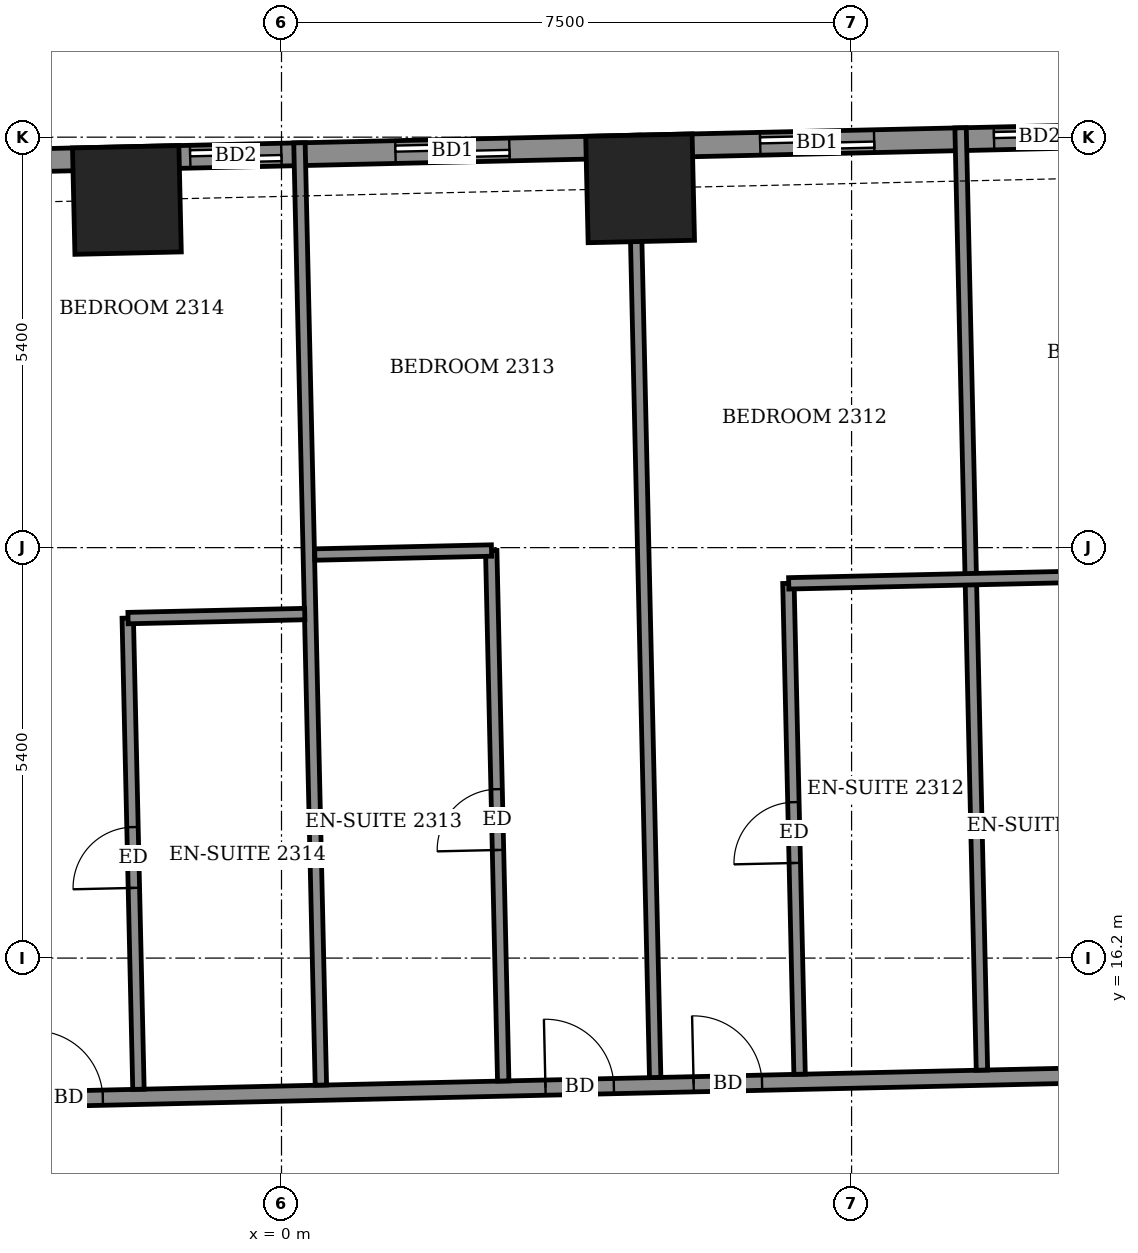
"""IFC4 building model, lengths in metres.
Left out: names, types, materials, properties, quantities, classifications, styles, units other than length and angle.
Written with IfcOpenShell. Run it as: python <this file> out.ifc"""

import sys

from ifc_helpers import new_model, si_unit, direction, frame, frame_2d, origin, origin_2d, place, context, subcontext, project, spatial, rectangle, extrude, element, fill, save


model = new_model("IFC4")
c1 = context("Model", 3, precision=1e-05, world=origin(), true_north=direction((0.0, 1.0)))
c2 = subcontext(c1, "Body", "Model", "MODEL_VIEW")
j1 = project(units=[si_unit("LENGTHUNIT", "METRE"), si_unit("PLANEANGLEUNIT", "RADIAN")], contexts=[c1])
p1 = place(None, origin())
s1 = spatial("IfcSite", under=j1, at=p1, CompositionType="ELEMENT")
p2 = place(p1, origin())
s2 = spatial("IfcBuilding", under=s1, at=p2, CompositionType="ELEMENT")
p3 = place(p2, frame((0.0, 0.0, 93.7)))
s3 = spatial("IfcBuildingStorey", under=s2, at=p3, CompositionType="ELEMENT", Elevation=93.7)
for number, where, z_axis, x_axis in (
    (1, (4.718, 26.327, -0.55), (0.0, 0.0, 1.0), (-1.0, -0.023, 0.0)),
    (2, (-2.034, 26.174, -0.55), (0.0, 0.0, 1.0), (-1.0, -0.023, 0.0)),
):
    element("IfcColumn", number, at=place(p3, frame(where, z_axis=z_axis, x_axis=x_axis)), inside=s3, PredefinedType="COLUMN", context=c2, shape_type="SweptSolid", body=[
        extrude(rectangle(XDim=1.4, YDim=1.4, at=origin_2d()), origin(), (0.0, 0.0, 1.0), 3.6),
    ])
p4 = place(p3, frame((24.809, 27.333, 0.0), z_axis=(0.0, 0.0, 1.0), x_axis=(-0.999742676884, -0.022684356233, 0.0)))
e3 = element("IfcWall", 3, at=p4, inside=s3, PredefinedType="SOLIDWALL", context=c2, shape_type="SweptSolid", body=[
    extrude(rectangle(XDim=47.301, YDim=0.3, at=frame_2d((23.651, 0.0))), origin(), (0.0, 0.0, 1.0), 3.05),
])
p5 = place(p4, frame((1.311, 0.0, 0.0)))
e4 = element("IfcOpeningElement", 4, at=p5, cuts=e3, PredefinedType="OPENING", context=c2, shape_type="SweptSolid", body=[
    extrude(rectangle(XDim=1.2, YDim=2.4, at=frame_2d((0.6, 1.2))), frame((0.0, 0.16, 0.0), z_axis=(0.0, -1.0, 0.0), x_axis=(1.0, 0.0, 0.0)), (0.0, 0.0, 1.0), 0.32),
])
p6 = place(p4, frame((3.763, 0.0, 0.0)))
e5 = element("IfcOpeningElement", 5, at=p6, cuts=e3, PredefinedType="OPENING", context=c2, shape_type="SweptSolid", body=[
    extrude(rectangle(XDim=1.5, YDim=2.4, at=frame_2d((0.75, 1.2))), frame((0.0, 0.16, 0.0), z_axis=(0.0, -1.0, 0.0), x_axis=(1.0, 0.0, 0.0)), (0.0, 0.0, 1.0), 0.32),
])
p7 = place(p4, frame((8.647, 0.0, 0.0)))
e6 = element("IfcOpeningElement", 6, at=p7, cuts=e3, PredefinedType="OPENING", context=c2, shape_type="SweptSolid", body=[
    extrude(rectangle(XDim=1.5, YDim=2.4, at=frame_2d((0.75, 1.2))), frame((0.0, 0.16, 0.0), z_axis=(0.0, -1.0, 0.0), x_axis=(1.0, 0.0, 0.0)), (0.0, 0.0, 1.0), 0.32),
])
p8 = place(p4, frame((14.239, 0.0, 0.0)))
e7 = element("IfcOpeningElement", 7, at=p8, cuts=e3, PredefinedType="OPENING", context=c2, shape_type="SweptSolid", body=[
    extrude(rectangle(XDim=1.2, YDim=2.4, at=frame_2d((0.6, 1.2))), frame((0.0, 0.16, 0.0), z_axis=(0.0, -1.0, 0.0), x_axis=(1.0, 0.0, 0.0)), (0.0, 0.0, 1.0), 0.32),
])
p9 = place(p4, frame((17.016, 0.0, 0.0)))
e8 = element("IfcOpeningElement", 8, at=p9, cuts=e3, PredefinedType="OPENING", context=c2, shape_type="SweptSolid", body=[
    extrude(rectangle(XDim=1.5, YDim=2.4, at=frame_2d((0.75, 1.2))), frame((0.0, 0.16, 0.0), z_axis=(0.0, -1.0, 0.0), x_axis=(1.0, 0.0, 0.0)), (0.0, 0.0, 1.0), 0.32),
])
p10 = place(p4, frame((21.816, 0.0, 0.0)))
e9 = element("IfcOpeningElement", 9, at=p10, cuts=e3, PredefinedType="OPENING", context=c2, shape_type="SweptSolid", body=[
    extrude(rectangle(XDim=1.5, YDim=2.4, at=frame_2d((0.75, 1.2))), frame((0.0, 0.16, 0.0), z_axis=(0.0, -1.0, 0.0), x_axis=(1.0, 0.0, 0.0)), (0.0, 0.0, 1.0), 0.32),
])
p11 = place(p4, frame((24.817, 0.0, 0.0)))
e10 = element("IfcOpeningElement", 10, at=p11, cuts=e3, PredefinedType="OPENING", context=c2, shape_type="SweptSolid", body=[
    extrude(rectangle(XDim=1.2, YDim=2.4, at=frame_2d((0.6, 1.2))), frame((0.0, 0.16, 0.0), z_axis=(0.0, -1.0, 0.0), x_axis=(1.0, 0.0, 0.0)), (0.0, 0.0, 1.0), 0.32),
])
p12 = place(p4, frame((30.244, 0.0, 0.0)))
e11 = element("IfcOpeningElement", 11, at=p12, cuts=e3, PredefinedType="OPENING", context=c2, shape_type="SweptSolid", body=[
    extrude(rectangle(XDim=1.5, YDim=2.4, at=frame_2d((0.75, 1.2))), frame((0.0, 0.16, 0.0), z_axis=(0.0, -1.0, 0.0), x_axis=(1.0, 0.0, 0.0)), (0.0, 0.0, 1.0), 0.32),
])
p13 = place(p4, frame((35.069, 0.0, 0.0)))
e12 = element("IfcOpeningElement", 12, at=p13, cuts=e3, PredefinedType="OPENING", context=c2, shape_type="SweptSolid", body=[
    extrude(rectangle(XDim=1.5, YDim=2.4, at=frame_2d((0.75, 1.2))), frame((0.0, 0.16, 0.0), z_axis=(0.0, -1.0, 0.0), x_axis=(1.0, 0.0, 0.0)), (0.0, 0.0, 1.0), 0.32),
])
p14 = place(p4, frame((37.995, 0.0, 0.0)))
e13 = element("IfcOpeningElement", 13, at=p14, cuts=e3, PredefinedType="OPENING", context=c2, shape_type="SweptSolid", body=[
    extrude(rectangle(XDim=1.5, YDim=2.4, at=frame_2d((0.75, 1.2))), frame((0.0, 0.16, 0.0), z_axis=(0.0, -1.0, 0.0), x_axis=(1.0, 0.0, 0.0)), (0.0, 0.0, 1.0), 0.32),
])
p15 = place(p4, frame((42.674, 0.0, 0.9)))
e14 = element("IfcOpeningElement", 14, at=p15, cuts=e3, PredefinedType="OPENING", context=c2, shape_type="SweptSolid", body=[
    extrude(rectangle(XDim=2.4, YDim=1.5, at=frame_2d((1.2, 0.75))), frame((0.0, 0.16, 0.0), z_axis=(0.0, -1.0, 0.0), x_axis=(1.0, 0.0, 0.0)), (0.0, 0.0, 1.0), 0.32),
])
p16 = place(p3, frame((-24.92, 13.851, 0.0), z_axis=(0.0, 0.0, 1.0), x_axis=(0.999742411711, 0.022696039895, 0.0)))
e15 = element("IfcWall", 15, at=p16, inside=s3, PredefinedType="PARTITIONING", context=c2, shape_type="SweptSolid", body=[
    extrude(rectangle(XDim=52.472, YDim=0.2, at=frame_2d((26.236, 0.0))), origin(), (0.0, 0.0, 1.0), 3.05),
])
p17 = place(p16, frame((50.088, 0.0, 0.0)))
e16 = element("IfcOpeningElement", 16, at=p17, cuts=e15, PredefinedType="OPENING", context=c2, shape_type="SweptSolid", body=[
    extrude(rectangle(XDim=1.0, YDim=2.1, at=frame_2d((0.5, 1.05))), frame((0.0, 0.11, 0.0), z_axis=(0.0, -1.0, 0.0), x_axis=(1.0, 0.0, 0.0)), (0.0, 0.0, 1.0), 0.22),
])
p18 = place(p16, frame((45.725, 0.0, 0.0)))
e17 = element("IfcOpeningElement", 17, at=p18, cuts=e15, PredefinedType="OPENING", context=c2, shape_type="SweptSolid", body=[
    extrude(rectangle(XDim=0.9, YDim=2.1, at=frame_2d((0.45, 1.05))), frame((0.0, 0.11, 0.0), z_axis=(0.0, -1.0, 0.0), x_axis=(1.0, 0.0, 0.0)), (0.0, 0.0, 1.0), 0.22),
])
p19 = place(p16, frame((38.975, 0.0, 0.0)))
e18 = element("IfcOpeningElement", 18, at=p19, cuts=e15, PredefinedType="OPENING", context=c2, shape_type="SweptSolid", body=[
    extrude(rectangle(XDim=0.9, YDim=2.1, at=frame_2d((0.45, 1.05))), frame((0.0, 0.11, 0.0), z_axis=(0.0, -1.0, 0.0), x_axis=(1.0, 0.0, 0.0)), (0.0, 0.0, 1.0), 0.22),
])
p20 = place(p16, frame((37.05, 0.0, 0.0)))
e19 = element("IfcOpeningElement", 19, at=p20, cuts=e15, PredefinedType="OPENING", context=c2, shape_type="SweptSolid", body=[
    extrude(rectangle(XDim=0.9, YDim=2.1, at=frame_2d((0.45, 1.05))), frame((0.0, 0.11, 0.0), z_axis=(0.0, -1.0, 0.0), x_axis=(1.0, 0.0, 0.0)), (0.0, 0.0, 1.0), 0.22),
])
p21 = place(p16, frame((30.35, 0.0, 0.0)))
e20 = element("IfcOpeningElement", 20, at=p21, cuts=e15, PredefinedType="OPENING", context=c2, shape_type="SweptSolid", body=[
    extrude(rectangle(XDim=0.9, YDim=2.1, at=frame_2d((0.45, 1.05))), frame((0.0, 0.11, 0.0), z_axis=(0.0, -1.0, 0.0), x_axis=(1.0, 0.0, 0.0)), (0.0, 0.0, 1.0), 0.22),
])
p22 = place(p16, frame((28.4, 0.0, 0.0)))
e21 = element("IfcOpeningElement", 21, at=p22, cuts=e15, PredefinedType="OPENING", context=c2, shape_type="SweptSolid", body=[
    extrude(rectangle(XDim=0.9, YDim=2.1, at=frame_2d((0.45, 1.05))), frame((0.0, 0.11, 0.0), z_axis=(0.0, -1.0, 0.0), x_axis=(1.0, 0.0, 0.0)), (0.0, 0.0, 1.0), 0.22),
])
p23 = place(p16, frame((21.675, 0.0, 0.0)))
e22 = element("IfcOpeningElement", 22, at=p23, cuts=e15, PredefinedType="OPENING", context=c2, shape_type="SweptSolid", body=[
    extrude(rectangle(XDim=0.9, YDim=2.1, at=frame_2d((0.45, 1.05))), frame((0.0, 0.11, 0.0), z_axis=(0.0, -1.0, 0.0), x_axis=(1.0, 0.0, 0.0)), (0.0, 0.0, 1.0), 0.22),
])
p24 = place(p16, frame((19.775, 0.0, 0.0)))
e23 = element("IfcOpeningElement", 23, at=p24, cuts=e15, PredefinedType="OPENING", context=c2, shape_type="SweptSolid", body=[
    extrude(rectangle(XDim=0.9, YDim=2.1, at=frame_2d((0.45, 1.05))), frame((0.0, 0.11, 0.0), z_axis=(0.0, -1.0, 0.0), x_axis=(1.0, 0.0, 0.0)), (0.0, 0.0, 1.0), 0.22),
])
p25 = place(p16, frame((13.0, 0.0, 0.0)))
e24 = element("IfcOpeningElement", 24, at=p25, cuts=e15, PredefinedType="OPENING", context=c2, shape_type="SweptSolid", body=[
    extrude(rectangle(XDim=0.9, YDim=2.1, at=frame_2d((0.45, 1.05))), frame((0.0, 0.11, 0.0), z_axis=(0.0, -1.0, 0.0), x_axis=(1.0, 0.0, 0.0)), (0.0, 0.0, 1.0), 0.22),
])
p26 = place(p16, frame((11.075, 0.0, 0.0)))
e25 = element("IfcOpeningElement", 25, at=p26, cuts=e15, PredefinedType="OPENING", context=c2, shape_type="SweptSolid", body=[
    extrude(rectangle(XDim=0.9, YDim=2.1, at=frame_2d((0.45, 1.05))), frame((0.0, 0.11, 0.0), z_axis=(0.0, -1.0, 0.0), x_axis=(1.0, 0.0, 0.0)), (0.0, 0.0, 1.0), 0.22),
])
p27 = place(p16, frame((3.049, 0.0, 0.0)))
e26 = element("IfcOpeningElement", 26, at=p27, cuts=e15, PredefinedType="OPENING", context=c2, shape_type="SweptSolid", body=[
    extrude(rectangle(XDim=1.0, YDim=2.1, at=frame_2d((0.5, 1.05))), frame((0.0, 0.11, 0.0), z_axis=(0.0, -1.0, 0.0), x_axis=(1.0, 0.0, 0.0)), (0.0, 0.0, 1.0), 0.22),
])
p28 = place(p3, frame((-1.882, 14.474, 0.0), z_axis=(0.0, 0.0, 1.0), x_axis=(-0.022718722157, 0.999741896523, 0.0)))
e27 = element("IfcWall", 27, at=p28, inside=s3, PredefinedType="PARTITIONING", context=c2, shape_type="SweptSolid", body=[
    extrude(rectangle(XDim=6.201, YDim=0.15, at=frame_2d((3.1, 0.0))), origin(), (0.0, 0.0, 1.0), 3.05),
])
p29 = place(p28, frame((2.65, 0.0, 0.0)))
e28 = element("IfcOpeningElement", 28, at=p29, cuts=e27, PredefinedType="OPENING", context=c2, shape_type="SweptSolid", body=[
    extrude(rectangle(XDim=0.8, YDim=2.1, at=frame_2d((0.4, 1.05))), frame((0.0, 0.085, 0.0), z_axis=(0.0, -1.0, 0.0), x_axis=(1.0, 0.0, 0.0)), (0.0, 0.0, 1.0), 0.17),
])
p30 = place(p3, frame((0.518, 14.529, 0.0), z_axis=(0.0, 0.0, 1.0), x_axis=(-0.022740189192, 0.999741408463, 0.0)))
e29 = element("IfcWall", 29, at=p30, inside=s3, PredefinedType="PARTITIONING", context=c2, shape_type="SweptSolid", body=[
    extrude(rectangle(XDim=12.4, YDim=0.15, at=frame_2d((6.2, 0.0))), origin(), (0.0, 0.0, 1.0), 2.55),
])
p31 = place(p3, frame((2.917, 14.583, 0.0), z_axis=(0.0, 0.0, 1.0), x_axis=(-0.022630826984, 0.999743890039, 0.0)))
e30 = element("IfcWall", 30, at=p31, inside=s3, PredefinedType="PARTITIONING", context=c2, shape_type="SweptSolid", body=[
    extrude(rectangle(XDim=6.98, YDim=0.15, at=frame_2d((3.49, 0.0))), origin(), (0.0, 0.0, 1.0), 3.05),
])
p32 = place(p31, frame((3.04, 0.0, 0.0)))
e31 = element("IfcOpeningElement", 31, at=p32, cuts=e30, PredefinedType="OPENING", context=c2, shape_type="SweptSolid", body=[
    extrude(rectangle(XDim=0.8, YDim=2.1, at=frame_2d((0.4, 1.05))), frame((0.0, 0.085, 0.0), z_axis=(0.0, -1.0, 0.0), x_axis=(1.0, 0.0, 0.0)), (0.0, 0.0, 1.0), 0.17),
])
p33 = place(p3, frame((4.916, 14.629, 0.0), z_axis=(0.0, 0.0, 1.0), x_axis=(-0.022663260168, 0.999743155335, 0.0)))
e32 = element("IfcWall", 32, at=p33, inside=s3, PredefinedType="PARTITIONING", context=c2, shape_type="SweptSolid", body=[
    extrude(rectangle(XDim=12.399, YDim=0.15, at=frame_2d((6.2, 0.0))), origin(), (0.0, 0.0, 1.0), 3.05),
])
p34 = place(p3, frame((6.816, 14.672, 0.0), z_axis=(0.0, 0.0, 1.0), x_axis=(-0.022753171905, 0.999741113073, 0.0)))
e33 = element("IfcWall", 33, at=p34, inside=s3, PredefinedType="PARTITIONING", context=c2, shape_type="SweptSolid", body=[
    extrude(rectangle(XDim=6.459, YDim=0.15, at=frame_2d((3.23, 0.0))), origin(), (0.0, 0.0, 1.0), 3.05),
])
p35 = place(p34, frame((2.78, 0.0, 0.0)))
e34 = element("IfcOpeningElement", 34, at=p35, cuts=e33, PredefinedType="OPENING", context=c2, shape_type="SweptSolid", body=[
    extrude(rectangle(XDim=0.8, YDim=2.1, at=frame_2d((0.4, 1.05))), frame((0.0, 0.085, 0.0), z_axis=(0.0, -1.0, 0.0), x_axis=(1.0, 0.0, 0.0)), (0.0, 0.0, 1.0), 0.17),
])
p36 = place(p3, frame((9.215, 14.726, 0.0), z_axis=(0.0, 0.0, 1.0), x_axis=(-0.022661475803, 0.999743195783, 0.0)))
e35 = element("IfcWall", 35, at=p36, inside=s3, PredefinedType="PARTITIONING", context=c2, shape_type="SweptSolid", body=[
    extrude(rectangle(XDim=12.4, YDim=0.15, at=frame_2d((6.2, 0.0))), origin(), (0.0, 0.0, 1.0), 2.55),
])
p37 = place(p3, frame((-2.019, 20.673, 0.0), z_axis=(0.0, 0.0, 1.0), x_axis=(0.999740478815, 0.022781023197, 0.0)))
e36 = element("IfcWall", 36, at=p37, inside=s3, PredefinedType="PARTITIONING", context=c2, shape_type="SweptSolid", body=[
    extrude(rectangle(XDim=2.325, YDim=0.15, at=frame_2d((1.163, 0.0))), origin(), (0.0, 0.0, 1.0), 3.05),
])
p38 = place(p3, frame((6.673, 21.13, 0.0), z_axis=(0.0, 0.0, 1.0), x_axis=(0.999741520352, 0.022735269617, 0.0)))
e37 = element("IfcWall", 37, at=p38, inside=s3, PredefinedType="PARTITIONING", context=c2, shape_type="SweptSolid", body=[
    extrude(rectangle(XDim=4.8, YDim=0.15, at=frame_2d((2.4, 0.0))), origin(), (0.0, 0.0, 1.0), 3.05),
])
p39 = place(p3, frame((0.438, 21.509, 0.0), z_axis=(0.0, 0.0, 1.0), x_axis=(0.999740478815, 0.022781023197, 0.0)))
e38 = element("IfcWall", 38, at=p39, inside=s3, PredefinedType="PARTITIONING", context=c2, shape_type="SweptSolid", body=[
    extrude(rectangle(XDim=2.325, YDim=0.15, at=frame_2d((1.163, 0.0))), origin(), (0.0, 0.0, 1.0), 3.05),
])
p40 = place(p8, origin())
e39 = element("IfcDoor", 39, at=p40, inside=s3, OperationType="SLIDING_TO_LEFT", PredefinedType="DOOR", context=c2, shape_type="SweptSolid", body=[
    extrude(rectangle(XDim=1.2, YDim=2.4, at=frame_2d((0.6, 1.2))), frame((0.0, 0.025, 0.0), z_axis=(0.0, -1.0, 0.0), x_axis=(1.0, 0.0, 0.0)), (0.0, 0.0, 1.0), 0.05),
])
fill(e7, e39)
p41 = place(p9, origin())
e40 = element("IfcDoor", 40, at=p41, inside=s3, OperationType="SLIDING_TO_LEFT", PredefinedType="DOOR", context=c2, shape_type="SweptSolid", body=[
    extrude(rectangle(XDim=1.5, YDim=2.4, at=frame_2d((0.75, 1.2))), frame((0.0, 0.025, 0.0), z_axis=(0.0, -1.0, 0.0), x_axis=(1.0, 0.0, 0.0)), (0.0, 0.0, 1.0), 0.05),
])
fill(e8, e40)
p42 = place(p10, origin())
e41 = element("IfcDoor", 41, at=p42, inside=s3, OperationType="SLIDING_TO_LEFT", PredefinedType="DOOR", context=c2, shape_type="SweptSolid", body=[
    extrude(rectangle(XDim=1.5, YDim=2.4, at=frame_2d((0.75, 1.2))), frame((0.0, 0.025, 0.0), z_axis=(0.0, -1.0, 0.0), x_axis=(1.0, 0.0, 0.0)), (0.0, 0.0, 1.0), 0.05),
])
fill(e9, e41)
p43 = place(p11, origin())
e42 = element("IfcDoor", 42, at=p43, inside=s3, OperationType="SLIDING_TO_LEFT", PredefinedType="DOOR", context=c2, shape_type="SweptSolid", body=[
    extrude(rectangle(XDim=1.2, YDim=2.4, at=frame_2d((0.6, 1.2))), frame((0.0, 0.025, 0.0), z_axis=(0.0, -1.0, 0.0), x_axis=(1.0, 0.0, 0.0)), (0.0, 0.0, 1.0), 0.05),
])
fill(e10, e42)
p44 = place(p21, origin())
e43 = element("IfcDoor", 43, at=p44, inside=s3, OperationType="SINGLE_SWING_RIGHT", PredefinedType="DOOR", context=c2, shape_type="SweptSolid", body=[
    extrude(rectangle(XDim=0.9, YDim=2.1, at=frame_2d((0.45, 1.05))), frame((0.0, 0.025, 0.0), z_axis=(0.0, -1.0, 0.0), x_axis=(1.0, 0.0, 0.0)), (0.0, 0.0, 1.0), 0.05),
])
fill(e20, e43)
p45 = place(p35, origin())
e44 = element("IfcDoor", 44, at=p45, inside=s3, OperationType="SINGLE_SWING_RIGHT", PredefinedType="DOOR", context=c2, shape_type="SweptSolid", body=[
    extrude(rectangle(XDim=0.8, YDim=2.1, at=frame_2d((0.4, 1.05))), frame((0.0, 0.025, 0.0), z_axis=(0.0, -1.0, 0.0), x_axis=(1.0, 0.0, 0.0)), (0.0, 0.0, 1.0), 0.05),
])
fill(e34, e44)
p46 = place(p22, origin())
e45 = element("IfcDoor", 45, at=p46, inside=s3, OperationType="SINGLE_SWING_LEFT", PredefinedType="DOOR", context=c2, shape_type="SweptSolid", body=[
    extrude(rectangle(XDim=0.9, YDim=2.1, at=frame_2d((0.45, 1.05))), frame((0.0, 0.025, 0.0), z_axis=(0.0, -1.0, 0.0), x_axis=(1.0, 0.0, 0.0)), (0.0, 0.0, 1.0), 0.05),
])
fill(e21, e45)
p47 = place(p32, origin())
e46 = element("IfcDoor", 46, at=p47, inside=s3, OperationType="SINGLE_SWING_LEFT", PredefinedType="DOOR", context=c2, shape_type="SweptSolid", body=[
    extrude(rectangle(XDim=0.8, YDim=2.1, at=frame_2d((0.4, 1.05))), frame((0.0, 0.025, 0.0), z_axis=(0.0, -1.0, 0.0), x_axis=(1.0, 0.0, 0.0)), (0.0, 0.0, 1.0), 0.05),
])
fill(e31, e46)
p48 = place(p23, origin())
e47 = element("IfcDoor", 47, at=p48, inside=s3, OperationType="SINGLE_SWING_RIGHT", PredefinedType="DOOR", context=c2, shape_type="SweptSolid", body=[
    extrude(rectangle(XDim=0.9, YDim=2.1, at=frame_2d((0.45, 1.05))), frame((0.0, 0.025, 0.0), z_axis=(0.0, -1.0, 0.0), x_axis=(1.0, 0.0, 0.0)), (0.0, 0.0, 1.0), 0.05),
])
fill(e22, e47)
p49 = place(p29, origin())
e48 = element("IfcDoor", 48, at=p49, inside=s3, OperationType="SINGLE_SWING_RIGHT", PredefinedType="DOOR", context=c2, shape_type="SweptSolid", body=[
    extrude(rectangle(XDim=0.8, YDim=2.1, at=frame_2d((0.4, 1.05))), frame((0.0, 0.025, 0.0), z_axis=(0.0, -1.0, 0.0), x_axis=(1.0, 0.0, 0.0)), (0.0, 0.0, 1.0), 0.05),
])
fill(e28, e48)
save(model, sys.argv[1])
